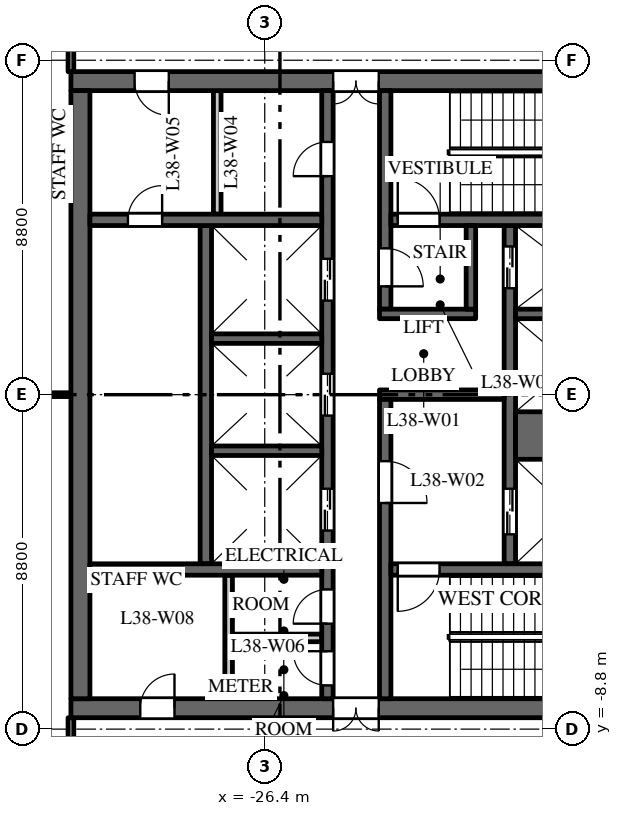
"""IFC4 building model, lengths in metres.
Left out: names, types, materials, properties, quantities, classifications, styles, units other than length and angle.
Written with IfcOpenShell. Run it as: python <this file> out.ifc"""

import sys

from ifc_helpers import new_model, si_unit, direction, frame, frame_2d, origin, place, context, subcontext, project, spatial, rectangle, extrude, element, fill, save


model = new_model("IFC4")
c1 = context("Model", 3, precision=1e-05, world=origin(), true_north=direction((0.0, 1.0)))
c2 = subcontext(c1, "Body", "Model", "MODEL_VIEW")
j1 = project(units=[si_unit("LENGTHUNIT", "METRE"), si_unit("PLANEANGLEUNIT", "RADIAN")], contexts=[c1])
p1 = place(None, origin())
s1 = spatial("IfcSite", under=j1, at=p1, CompositionType="ELEMENT")
p2 = place(p1, origin())
s2 = spatial("IfcBuilding", under=s1, at=p2, CompositionType="ELEMENT")
p3 = place(p2, frame((0.0, 0.0, 166.0)))
s3 = spatial("IfcBuildingStorey", under=s2, at=p3, CompositionType="ELEMENT", Elevation=166.0)
p4 = place(p3, frame((-16.5, 8.25, 0.0), z_axis=(0.0, 0.0, 1.0), x_axis=(-1.0, 0.0, 0.0)))
e1 = element("IfcWall", 1, at=p4, inside=s3, PredefinedType="SHEAR", context=c2, shape_type="SweptSolid", body=[
    extrude(rectangle(XDim=15.0, YDim=0.5, at=frame_2d((7.5, 0.0))), origin(), (0.0, 0.0, 1.0), 3.7),
])
p5 = place(p4, frame((6.9, 0.0, 0.0)))
e2 = element("IfcOpeningElement", 2, at=p5, cuts=e1, PredefinedType="OPENING", context=c2, shape_type="SweptSolid", body=[
    extrude(rectangle(XDim=1.2, YDim=2.1, at=frame_2d((0.6, 1.05))), frame((0.0, 0.26, 0.0), z_axis=(0.0, -1.0, 0.0), x_axis=(1.0, 0.0, 0.0)), (0.0, 0.0, 1.0), 0.52),
])
p6 = place(p4, frame((12.425, 0.0, 0.0)))
e3 = element("IfcOpeningElement", 3, at=p6, cuts=e1, PredefinedType="OPENING", context=c2, shape_type="SweptSolid", body=[
    extrude(rectangle(XDim=0.9, YDim=2.1, at=frame_2d((0.45, 1.05))), frame((0.0, 0.26, 0.0), z_axis=(0.0, -1.0, 0.0), x_axis=(1.0, 0.0, 0.0)), (0.0, 0.0, 1.0), 0.52),
])
p7 = place(p3, frame((-16.5, -8.25, 0.0), z_axis=(0.0, 0.0, 1.0), x_axis=(-1.0, 0.0, 0.0)))
e4 = element("IfcWall", 4, at=p7, inside=s3, PredefinedType="SHEAR", context=c2, shape_type="SweptSolid", body=[
    extrude(rectangle(XDim=15.0, YDim=0.5, at=frame_2d((7.5, 0.0))), origin(), (0.0, 0.0, 1.0), 3.7),
])
p8 = place(p7, frame((6.9, 0.0, 0.0)))
e5 = element("IfcOpeningElement", 5, at=p8, cuts=e4, PredefinedType="OPENING", context=c2, shape_type="SweptSolid", body=[
    extrude(rectangle(XDim=1.2, YDim=2.1, at=frame_2d((0.6, 1.05))), frame((0.0, 0.26, 0.0), z_axis=(0.0, -1.0, 0.0), x_axis=(1.0, 0.0, 0.0)), (0.0, 0.0, 1.0), 0.52),
])
p9 = place(p7, frame((12.275, 0.0, 0.0)))
e6 = element("IfcOpeningElement", 6, at=p9, cuts=e4, PredefinedType="OPENING", context=c2, shape_type="SweptSolid", body=[
    extrude(rectangle(XDim=0.9, YDim=2.1, at=frame_2d((0.45, 1.05))), frame((0.0, 0.26, 0.0), z_axis=(0.0, -1.0, 0.0), x_axis=(1.0, 0.0, 0.0)), (0.0, 0.0, 1.0), 0.52),
])
p10 = place(p3, frame((-27.95, -4.45, 0.0), z_axis=(0.0, 0.0, 1.0), x_axis=(0.0, 1.0, 0.0)))
e7 = element("IfcWall", 7, at=p10, inside=s3, PredefinedType="SHEAR", context=c2, shape_type="SweptSolid", body=[
    extrude(rectangle(XDim=8.9, YDim=0.3, at=frame_2d((4.45, 0.0))), origin(), (0.0, 0.0, 1.0), 3.7),
])
p11 = place(p3, frame((-19.95, -4.45, 0.0), z_axis=(0.0, 0.0, 1.0), x_axis=(0.0, 1.0, 0.0)))
e8 = element("IfcWall", 8, at=p11, inside=s3, PredefinedType="SHEAR", context=c2, shape_type="SweptSolid", body=[
    extrude(rectangle(XDim=8.9, YDim=0.3, at=frame_2d((4.45, 0.0))), origin(), (0.0, 0.0, 1.0), 3.7),
])
p12 = place(p11, frame((0.775, 0.0, 0.0)))
e9 = element("IfcOpeningElement", 9, at=p12, cuts=e8, PredefinedType="OPENING", context=c2, shape_type="SweptSolid", body=[
    extrude(rectangle(XDim=1.2, YDim=2.1, at=frame_2d((0.6, 1.05))), frame((0.0, 0.16, 0.0), z_axis=(0.0, -1.0, 0.0), x_axis=(1.0, 0.0, 0.0)), (0.0, 0.0, 1.0), 0.32),
])
p13 = place(p11, frame((7.25, 0.0, 0.0)))
e10 = element("IfcOpeningElement", 10, at=p13, cuts=e8, PredefinedType="OPENING", context=c2, shape_type="SweptSolid", body=[
    extrude(rectangle(XDim=1.1, YDim=2.1, at=frame_2d((0.55, 1.05))), frame((0.0, 0.16, 0.0), z_axis=(0.0, -1.0, 0.0), x_axis=(1.0, 0.0, 0.0)), (0.0, 0.0, 1.0), 0.32),
])
p14 = place(p3, frame((-24.75, -8.0, 0.0), z_axis=(0.0, 0.0, 1.0), x_axis=(0.0, 1.0, 0.0)))
e11 = element("IfcWall", 11, at=p14, inside=s3, PredefinedType="SHEAR", context=c2, shape_type="SweptSolid", body=[
    extrude(rectangle(XDim=16.0, YDim=0.3, at=frame_2d((8.0, 0.0))), origin(), (0.0, 0.0, 1.0), 3.7),
])
p15 = place(p14, frame((4.425, 0.0, 0.0)))
e12 = element("IfcOpeningElement", 12, at=p15, cuts=e11, PredefinedType="OPENING", context=c2, shape_type="SweptSolid", body=[
    extrude(rectangle(XDim=1.1, YDim=2.1, at=frame_2d((0.55, 1.05))), frame((0.0, 0.16, 0.0), z_axis=(0.0, -1.0, 0.0), x_axis=(1.0, 0.0, 0.0)), (0.0, 0.0, 1.0), 0.32),
])
p16 = place(p14, frame((7.45, 0.0, 0.0)))
e13 = element("IfcOpeningElement", 13, at=p16, cuts=e11, PredefinedType="OPENING", context=c2, shape_type="SweptSolid", body=[
    extrude(rectangle(XDim=1.1, YDim=2.1, at=frame_2d((0.55, 1.05))), frame((0.0, 0.16, 0.0), z_axis=(0.0, -1.0, 0.0), x_axis=(1.0, 0.0, 0.0)), (0.0, 0.0, 1.0), 0.32),
])
p17 = place(p14, frame((10.475, 0.0, 0.0)))
e14 = element("IfcOpeningElement", 14, at=p17, cuts=e11, PredefinedType="OPENING", context=c2, shape_type="SweptSolid", body=[
    extrude(rectangle(XDim=1.1, YDim=2.1, at=frame_2d((0.55, 1.05))), frame((0.0, 0.16, 0.0), z_axis=(0.0, -1.0, 0.0), x_axis=(1.0, 0.0, 0.0)), (0.0, 0.0, 1.0), 0.32),
])
p18 = place(p14, frame((13.75, 0.0, 0.0)))
e15 = element("IfcOpeningElement", 15, at=p18, cuts=e11, PredefinedType="OPENING", context=c2, shape_type="SweptSolid", body=[
    extrude(rectangle(XDim=0.9, YDim=2.1, at=frame_2d((0.45, 1.05))), frame((0.0, 0.16, 0.0), z_axis=(0.0, -1.0, 0.0), x_axis=(1.0, 0.0, 0.0)), (0.0, 0.0, 1.0), 0.32),
])
p19 = place(p14, frame((1.975, 0.0, 0.0)))
e16 = element("IfcOpeningElement", 16, at=p19, cuts=e11, PredefinedType="OPENING", context=c2, shape_type="SweptSolid", body=[
    extrude(rectangle(XDim=0.9, YDim=2.1, at=frame_2d((0.45, 1.05))), frame((0.0, 0.16, 0.0), z_axis=(0.0, -1.0, 0.0), x_axis=(1.0, 0.0, 0.0)), (0.0, 0.0, 1.0), 0.32),
])
p20 = place(p14, frame((0.35, 0.0, 0.0)))
e17 = element("IfcOpeningElement", 17, at=p20, cuts=e11, PredefinedType="OPENING", context=c2, shape_type="SweptSolid", body=[
    extrude(rectangle(XDim=0.9, YDim=2.1, at=frame_2d((0.45, 1.05))), frame((0.0, 0.16, 0.0), z_axis=(0.0, -1.0, 0.0), x_axis=(1.0, 0.0, 0.0)), (0.0, 0.0, 1.0), 0.32),
])
p21 = place(p3, frame((-20.1, 0.0, 0.0), z_axis=(0.0, 0.0, 1.0), x_axis=(-1.0, 0.0, 0.0)))
e18 = element("IfcWall", 18, at=p21, inside=s3, PredefinedType="SHEAR", context=c2, shape_type="SweptSolid", body=[
    extrude(rectangle(XDim=3.28, YDim=0.25, at=frame_2d((1.64, 0.0))), origin(), (0.0, 0.0, 1.0), 3.7),
])
p22 = place(p3, frame((-31.25, -8.0, 0.0), z_axis=(0.0, 0.0, 1.0), x_axis=(0.0, 1.0, 0.0)))
e19 = element("IfcWall", 19, at=p22, inside=s3, PredefinedType="SHEAR", context=c2, shape_type="SweptSolid", body=[
    extrude(rectangle(XDim=16.0, YDim=0.5, at=frame_2d((8.0, 0.0))), origin(), (0.0, 0.0, 1.0), 3.7),
])
p23 = place(p3, frame((-24.9, 4.6, 0.0), z_axis=(0.0, 0.0, 1.0), x_axis=(-1.0, 0.0, 0.0)))
e20 = element("IfcWall", 20, at=p23, inside=s3, PredefinedType="SHEAR", context=c2, shape_type="SweptSolid", body=[
    extrude(rectangle(XDim=6.1, YDim=0.3, at=frame_2d((3.05, 0.0))), origin(), (0.0, 0.0, 1.0), 3.7),
])
p24 = place(p23, frame((4.2, 0.0, 0.0)))
e21 = element("IfcOpeningElement", 21, at=p24, cuts=e20, PredefinedType="OPENING", context=c2, shape_type="SweptSolid", body=[
    extrude(rectangle(XDim=0.9, YDim=2.1, at=frame_2d((0.45, 1.05))), frame((0.0, 0.16, 0.0), z_axis=(0.0, -1.0, 0.0), x_axis=(1.0, 0.0, 0.0)), (0.0, 0.0, 1.0), 0.32),
])
for number, where, z_axis, x_axis in (
    (22, (-27.65, 4.75, 0.0), (0.0, 0.0, 1.0), (0.0, 1.0, 0.0)),
    (23, (-27.35, -8.0, 0.0), (0.0, 0.0, 1.0), (0.0, 1.0, 0.0)),
):
    element("IfcWall", number, at=place(p3, frame(where, z_axis=z_axis, x_axis=x_axis)), inside=s3, PredefinedType="PARTITIONING", context=c2, shape_type="SweptSolid", body=[
        extrude(rectangle(XDim=3.25, YDim=0.2, at=frame_2d((1.625, 0.0))), origin(), (0.0, 0.0, 1.0), 3.7),
    ])
p25 = place(p3, frame((-24.9, -6.4, 0.0), z_axis=(0.0, 0.0, 1.0), x_axis=(-1.0, 0.0, 0.0)))
e24 = element("IfcWall", 24, at=p25, inside=s3, PredefinedType="PARTITIONING", context=c2, shape_type="SweptSolid", body=[
    extrude(rectangle(XDim=2.35, YDim=0.2, at=frame_2d((1.175, 0.0))), origin(), (0.0, 0.0, 1.0), 3.7),
])
p26 = place(p3, frame((-24.9, -4.6, 0.0), z_axis=(0.0, 0.0, 1.0), x_axis=(-1.0, 0.0, 0.0)))
e25 = element("IfcWall", 25, at=p26, inside=s3, PredefinedType="SHEAR", context=c2, shape_type="SweptSolid", body=[
    extrude(rectangle(XDim=6.1, YDim=0.3, at=frame_2d((3.05, 0.0))), origin(), (0.0, 0.0, 1.0), 3.7),
])
p27 = place(p3, frame((-16.9, -1.075, 0.0), z_axis=(0.0, 0.0, 1.0), x_axis=(-1.0, 0.0, 0.0)))
e26 = element("IfcWall", 26, at=p27, inside=s3, PredefinedType="SHEAR", context=c2, shape_type="SweptSolid", body=[
    extrude(rectangle(XDim=2.9, YDim=1.25, at=frame_2d((1.45, 0.0))), origin(), (0.0, 0.0, 1.0), 3.7),
])
for number, where, z_axis, x_axis in (
    (27, (-16.9, 2.125, 0.0), (0.0, 0.0, 1.0), (-1.0, 0.0, 0.0)),
    (28, (-24.9, -1.475, 0.0), (0.0, 0.0, 1.0), (-1.0, 0.0, 0.0)),
    (29, (-24.9, 1.475, 0.0), (0.0, 0.0, 1.0), (-1.0, 0.0, 0.0)),
):
    element("IfcWall", number, at=place(p3, frame(where, z_axis=z_axis, x_axis=x_axis)), inside=s3, PredefinedType="SHEAR", context=c2, shape_type="SweptSolid", body=[
        extrude(rectangle(XDim=2.9, YDim=0.25, at=frame_2d((1.45, 0.0))), origin(), (0.0, 0.0, 1.0), 3.7),
    ])
p28 = place(p3, frame((-23.23, 2.25, 0.0), z_axis=(0.0, 0.0, 1.0), x_axis=(0.0, 1.0, 0.0)))
e30 = element("IfcWall", 30, at=p28, inside=s3, PredefinedType="SHEAR", context=c2, shape_type="SweptSolid", body=[
    extrude(rectangle(XDim=5.75, YDim=0.3, at=frame_2d((2.875, 0.0))), origin(), (0.0, 0.0, 1.0), 3.7),
])
p29 = place(p28, frame((0.6, 0.0, 0.0)))
e31 = element("IfcOpeningElement", 31, at=p29, cuts=e30, PredefinedType="OPENING", context=c2, shape_type="SweptSolid", body=[
    extrude(rectangle(XDim=1.0, YDim=2.1, at=frame_2d((0.5, 1.05))), frame((0.0, 0.16, 0.0), z_axis=(0.0, -1.0, 0.0), x_axis=(1.0, 0.0, 0.0)), (0.0, 0.0, 1.0), 0.32),
])
p30 = place(p3, frame((-23.23, -8.0, 0.0), z_axis=(0.0, 0.0, 1.0), x_axis=(0.0, 1.0, 0.0)))
e32 = element("IfcWall", 32, at=p30, inside=s3, PredefinedType="SHEAR", context=c2, shape_type="SweptSolid", body=[
    extrude(rectangle(XDim=7.875, YDim=0.3, at=frame_2d((3.938, 0.0))), origin(), (0.0, 0.0, 1.0), 3.7),
])
p31 = place(p30, frame((5.15, 0.0, 0.0)))
e33 = element("IfcOpeningElement", 33, at=p31, cuts=e32, PredefinedType="OPENING", context=c2, shape_type="SweptSolid", body=[
    extrude(rectangle(XDim=1.1, YDim=2.1, at=frame_2d((0.55, 1.05))), frame((0.0, 0.16, 0.0), z_axis=(0.0, -1.0, 0.0), x_axis=(1.0, 0.0, 0.0)), (0.0, 0.0, 1.0), 0.32),
])
p32 = place(p3, frame((-16.9, 4.6, 0.0), z_axis=(0.0, 0.0, 1.0), x_axis=(-1.0, 0.0, 0.0)))
e34 = element("IfcWall", 34, at=p32, inside=s3, PredefinedType="SHEAR", context=c2, shape_type="SweptSolid", body=[
    extrude(rectangle(XDim=6.18, YDim=0.3, at=frame_2d((3.09, 0.0))), origin(), (0.0, 0.0, 1.0), 3.7),
])
p33 = place(p32, frame((4.9, 0.0, 0.0)))
e35 = element("IfcOpeningElement", 35, at=p33, cuts=e34, PredefinedType="OPENING", context=c2, shape_type="SweptSolid", body=[
    extrude(rectangle(XDim=1.1, YDim=2.1, at=frame_2d((0.55, 1.05))), frame((0.0, 0.16, 0.0), z_axis=(0.0, -1.0, 0.0), x_axis=(1.0, 0.0, 0.0)), (0.0, 0.0, 1.0), 0.32),
])
p34 = place(p3, frame((-16.9, -4.6, 0.0), z_axis=(0.0, 0.0, 1.0), x_axis=(-1.0, 0.0, 0.0)))
e36 = element("IfcWall", 36, at=p34, inside=s3, PredefinedType="SHEAR", context=c2, shape_type="SweptSolid", body=[
    extrude(rectangle(XDim=6.18, YDim=0.3, at=frame_2d((3.09, 0.0))), origin(), (0.0, 0.0, 1.0), 3.7),
])
p35 = place(p34, frame((4.9, 0.0, 0.0)))
e37 = element("IfcOpeningElement", 37, at=p35, cuts=e36, PredefinedType="OPENING", context=c2, shape_type="SweptSolid", body=[
    extrude(rectangle(XDim=1.1, YDim=2.1, at=frame_2d((0.55, 1.05))), frame((0.0, 0.16, 0.0), z_axis=(0.0, -1.0, 0.0), x_axis=(1.0, 0.0, 0.0)), (0.0, 0.0, 1.0), 0.32),
])
p36 = place(p3, frame((-20.85, 2.125, 0.0), z_axis=(0.0, 0.0, 1.0), x_axis=(-1.0, 0.0, 0.0)))
e38 = element("IfcWall", 38, at=p36, inside=s3, PredefinedType="SHEAR", context=c2, shape_type="SweptSolid", body=[
    extrude(rectangle(XDim=2.53, YDim=0.25, at=frame_2d((1.265, 0.0))), origin(), (0.0, 0.0, 1.0), 3.7),
])
p37 = place(p3, frame((-20.975, 2.25, 0.0), z_axis=(0.0, 0.0, 1.0), x_axis=(0.0, 1.0, 0.0)))
e39 = element("IfcWall", 39, at=p37, inside=s3, PredefinedType="SHEAR", context=c2, shape_type="SweptSolid", body=[
    extrude(rectangle(XDim=2.2, YDim=0.25, at=frame_2d((1.1, 0.0))), origin(), (0.0, 0.0, 1.0), 3.7),
])
p38 = place(p3, frame((-35.949, 0.0, 0.0), z_axis=(0.0, 0.0, 1.0), x_axis=(1.0, 0.0, 0.0)))
e40 = element("IfcWall", 40, at=p38, inside=s3, PredefinedType="PARTITIONING", context=c2, shape_type="SweptSolid", body=[
    extrude(rectangle(XDim=4.449, YDim=0.1, at=frame_2d((2.225, 0.0))), origin(), (0.0, 0.0, 1.0), 2.9),
])
p39 = place(p3, frame((-31.5, -10.7, 0.0), z_axis=(0.0, 0.0, 1.0), x_axis=(0.0, 1.0, 0.0)))
e41 = element("IfcWall", 41, at=p39, inside=s3, PredefinedType="PARTITIONING", context=c2, shape_type="SweptSolid", body=[
    extrude(rectangle(XDim=2.2, YDim=0.15, at=frame_2d((1.1, 0.0))), origin(), (0.0, 0.0, 1.0), 3.7),
])
p40 = place(p39, frame((0.55, 0.0, 0.0)))
e42 = element("IfcOpeningElement", 42, at=p40, cuts=e41, PredefinedType="OPENING", context=c2, shape_type="SweptSolid", body=[
    extrude(rectangle(XDim=1.0, YDim=2.1, at=frame_2d((0.5, 1.05))), frame((0.0, 0.085, 0.0), z_axis=(0.0, -1.0, 0.0), x_axis=(1.0, 0.0, 0.0)), (0.0, 0.0, 1.0), 0.17),
])
p41 = place(p3, frame((-31.5, 8.5, 0.0), z_axis=(0.0, 0.0, 1.0), x_axis=(0.0, 1.0, 0.0)))
e43 = element("IfcWall", 43, at=p41, inside=s3, PredefinedType="PARTITIONING", context=c2, shape_type="SweptSolid", body=[
    extrude(rectangle(XDim=2.2, YDim=0.15, at=frame_2d((1.1, 0.0))), origin(), (0.0, 0.0, 1.0), 3.7),
])
p42 = place(p41, frame((0.55, 0.0, 0.0)))
e44 = element("IfcOpeningElement", 44, at=p42, cuts=e43, PredefinedType="OPENING", context=c2, shape_type="SweptSolid", body=[
    extrude(rectangle(XDim=1.0, YDim=2.1, at=frame_2d((0.5, 1.05))), frame((0.0, 0.085, 0.0), z_axis=(0.0, -1.0, 0.0), x_axis=(1.0, 0.0, 0.0)), (0.0, 0.0, 1.0), 0.17),
])
p43 = place(p12, origin())
e45 = element("IfcDoor", 45, at=p43, inside=s3, OperationType="DOUBLE_DOOR_SLIDING", PredefinedType="DOOR", context=c2, shape_type="SweptSolid", body=[
    extrude(rectangle(XDim=1.2, YDim=2.1, at=frame_2d((0.6, 1.05))), frame((0.0, 0.025, 0.0), z_axis=(0.0, -1.0, 0.0), x_axis=(1.0, 0.0, 0.0)), (0.0, 0.0, 1.0), 0.05),
])
fill(e9, e45)
p44 = place(p13, origin())
e46 = element("IfcDoor", 46, at=p44, inside=s3, OperationType="DOUBLE_DOOR_SLIDING", PredefinedType="DOOR", context=c2, shape_type="SweptSolid", body=[
    extrude(rectangle(XDim=1.1, YDim=2.1, at=frame_2d((0.55, 1.05))), frame((0.0, 0.025, 0.0), z_axis=(0.0, -1.0, 0.0), x_axis=(1.0, 0.0, 0.0)), (0.0, 0.0, 1.0), 0.05),
])
fill(e10, e46)
p45 = place(p15, origin())
e47 = element("IfcDoor", 47, at=p45, inside=s3, OperationType="DOUBLE_DOOR_SLIDING", PredefinedType="DOOR", context=c2, shape_type="SweptSolid", body=[
    extrude(rectangle(XDim=1.1, YDim=2.1, at=frame_2d((0.55, 1.05))), frame((0.0, 0.025, 0.0), z_axis=(0.0, -1.0, 0.0), x_axis=(1.0, 0.0, 0.0)), (0.0, 0.0, 1.0), 0.05),
])
fill(e12, e47)
p46 = place(p16, origin())
e48 = element("IfcDoor", 48, at=p46, inside=s3, OperationType="DOUBLE_DOOR_SLIDING", PredefinedType="DOOR", context=c2, shape_type="SweptSolid", body=[
    extrude(rectangle(XDim=1.1, YDim=2.1, at=frame_2d((0.55, 1.05))), frame((0.0, 0.025, 0.0), z_axis=(0.0, -1.0, 0.0), x_axis=(1.0, 0.0, 0.0)), (0.0, 0.0, 1.0), 0.05),
])
fill(e13, e48)
p47 = place(p17, origin())
e49 = element("IfcDoor", 49, at=p47, inside=s3, OperationType="DOUBLE_DOOR_SLIDING", PredefinedType="DOOR", context=c2, shape_type="SweptSolid", body=[
    extrude(rectangle(XDim=1.1, YDim=2.1, at=frame_2d((0.55, 1.05))), frame((0.0, 0.025, 0.0), z_axis=(0.0, -1.0, 0.0), x_axis=(1.0, 0.0, 0.0)), (0.0, 0.0, 1.0), 0.05),
])
fill(e14, e49)
p48 = place(p33, origin())
e50 = element("IfcDoor", 50, at=p48, inside=s3, OperationType="SINGLE_SWING_RIGHT", PredefinedType="DOOR", context=c2, shape_type="SweptSolid", body=[
    extrude(rectangle(XDim=1.1, YDim=2.1, at=frame_2d((0.55, 1.05))), frame((0.0, 0.025, 0.0), z_axis=(0.0, -1.0, 0.0), x_axis=(1.0, 0.0, 0.0)), (0.0, 0.0, 1.0), 0.05),
])
fill(e35, e50)
p49 = place(p35, origin())
e51 = element("IfcDoor", 51, at=p49, inside=s3, OperationType="SINGLE_SWING_LEFT", PredefinedType="DOOR", context=c2, shape_type="SweptSolid", body=[
    extrude(rectangle(XDim=1.1, YDim=2.1, at=frame_2d((0.55, 1.05))), frame((0.0, 0.025, 0.0), z_axis=(0.0, -1.0, 0.0), x_axis=(1.0, 0.0, 0.0)), (0.0, 0.0, 1.0), 0.05),
])
fill(e37, e51)
p50 = place(p31, origin())
e52 = element("IfcDoor", 52, at=p50, inside=s3, OperationType="SINGLE_SWING_LEFT", PredefinedType="DOOR", context=c2, shape_type="SweptSolid", body=[
    extrude(rectangle(XDim=1.1, YDim=2.1, at=frame_2d((0.55, 1.05))), frame((0.0, 0.025, 0.0), z_axis=(0.0, -1.0, 0.0), x_axis=(1.0, 0.0, 0.0)), (0.0, 0.0, 1.0), 0.05),
])
fill(e33, e52)
p51 = place(p29, origin())
e53 = element("IfcDoor", 53, at=p51, inside=s3, OperationType="SINGLE_SWING_LEFT", PredefinedType="DOOR", context=c2, shape_type="SweptSolid", body=[
    extrude(rectangle(XDim=1.0, YDim=2.1, at=frame_2d((0.5, 1.05))), frame((0.0, 0.025, 0.0), z_axis=(0.0, -1.0, 0.0), x_axis=(1.0, 0.0, 0.0)), (0.0, 0.0, 1.0), 0.05),
])
fill(e31, e53)
p52 = place(p5, origin())
e54 = element("IfcDoor", 54, at=p52, inside=s3, OperationType="DOUBLE_DOOR_DOUBLE_SWING", PredefinedType="DOOR", context=c2, shape_type="SweptSolid", body=[
    extrude(rectangle(XDim=1.2, YDim=2.1, at=frame_2d((0.6, 1.05))), frame((0.0, 0.025, 0.0), z_axis=(0.0, -1.0, 0.0), x_axis=(1.0, 0.0, 0.0)), (0.0, 0.0, 1.0), 0.05),
])
fill(e2, e54)
p53 = place(p8, origin())
e55 = element("IfcDoor", 55, at=p53, inside=s3, OperationType="DOUBLE_DOOR_DOUBLE_SWING", PredefinedType="DOOR", context=c2, shape_type="SweptSolid", body=[
    extrude(rectangle(XDim=1.2, YDim=2.1, at=frame_2d((0.6, 1.05))), frame((0.0, 0.025, 0.0), z_axis=(0.0, -1.0, 0.0), x_axis=(1.0, 0.0, 0.0)), (0.0, 0.0, 1.0), 0.05),
])
fill(e5, e55)
p54 = place(p18, origin())
e56 = element("IfcDoor", 56, at=p54, inside=s3, OperationType="SINGLE_SWING_RIGHT", PredefinedType="DOOR", context=c2, shape_type="SweptSolid", body=[
    extrude(rectangle(XDim=0.9, YDim=2.1, at=frame_2d((0.45, 1.05))), frame((0.0, 0.025, 0.0), z_axis=(0.0, -1.0, 0.0), x_axis=(1.0, 0.0, 0.0)), (0.0, 0.0, 1.0), 0.05),
])
fill(e15, e56)
p55 = place(p6, origin())
e57 = element("IfcDoor", 57, at=p55, inside=s3, OperationType="SINGLE_SWING_RIGHT", PredefinedType="DOOR", context=c2, shape_type="SweptSolid", body=[
    extrude(rectangle(XDim=0.9, YDim=2.1, at=frame_2d((0.45, 1.05))), frame((0.0, 0.025, 0.0), z_axis=(0.0, -1.0, 0.0), x_axis=(1.0, 0.0, 0.0)), (0.0, 0.0, 1.0), 0.05),
])
fill(e3, e57)
p56 = place(p19, origin())
e58 = element("IfcDoor", 58, at=p56, inside=s3, OperationType="SINGLE_SWING_RIGHT", PredefinedType="DOOR", context=c2, shape_type="SweptSolid", body=[
    extrude(rectangle(XDim=0.9, YDim=2.1, at=frame_2d((0.45, 1.05))), frame((0.0, 0.025, 0.0), z_axis=(0.0, -1.0, 0.0), x_axis=(1.0, 0.0, 0.0)), (0.0, 0.0, 1.0), 0.05),
])
fill(e16, e58)
p57 = place(p20, origin())
e59 = element("IfcDoor", 59, at=p57, inside=s3, OperationType="SINGLE_SWING_LEFT", PredefinedType="DOOR", context=c2, shape_type="SweptSolid", body=[
    extrude(rectangle(XDim=0.9, YDim=2.1, at=frame_2d((0.45, 1.05))), frame((0.0, 0.025, 0.0), z_axis=(0.0, -1.0, 0.0), x_axis=(1.0, 0.0, 0.0)), (0.0, 0.0, 1.0), 0.05),
])
fill(e17, e59)
p58 = place(p9, origin())
e60 = element("IfcDoor", 60, at=p58, inside=s3, OperationType="SINGLE_SWING_LEFT", PredefinedType="DOOR", context=c2, shape_type="SweptSolid", body=[
    extrude(rectangle(XDim=0.9, YDim=2.1, at=frame_2d((0.45, 1.05))), frame((0.0, 0.025, 0.0), z_axis=(0.0, -1.0, 0.0), x_axis=(1.0, 0.0, 0.0)), (0.0, 0.0, 1.0), 0.05),
])
fill(e6, e60)
p59 = place(p24, origin())
e61 = element("IfcDoor", 61, at=p59, inside=s3, OperationType="SINGLE_SWING_LEFT", PredefinedType="DOOR", context=c2, shape_type="SweptSolid", body=[
    extrude(rectangle(XDim=0.9, YDim=2.1, at=frame_2d((0.45, 1.05))), frame((0.0, 0.025, 0.0), z_axis=(0.0, -1.0, 0.0), x_axis=(1.0, 0.0, 0.0)), (0.0, 0.0, 1.0), 0.05),
])
fill(e21, e61)
save(model, sys.argv[1])
